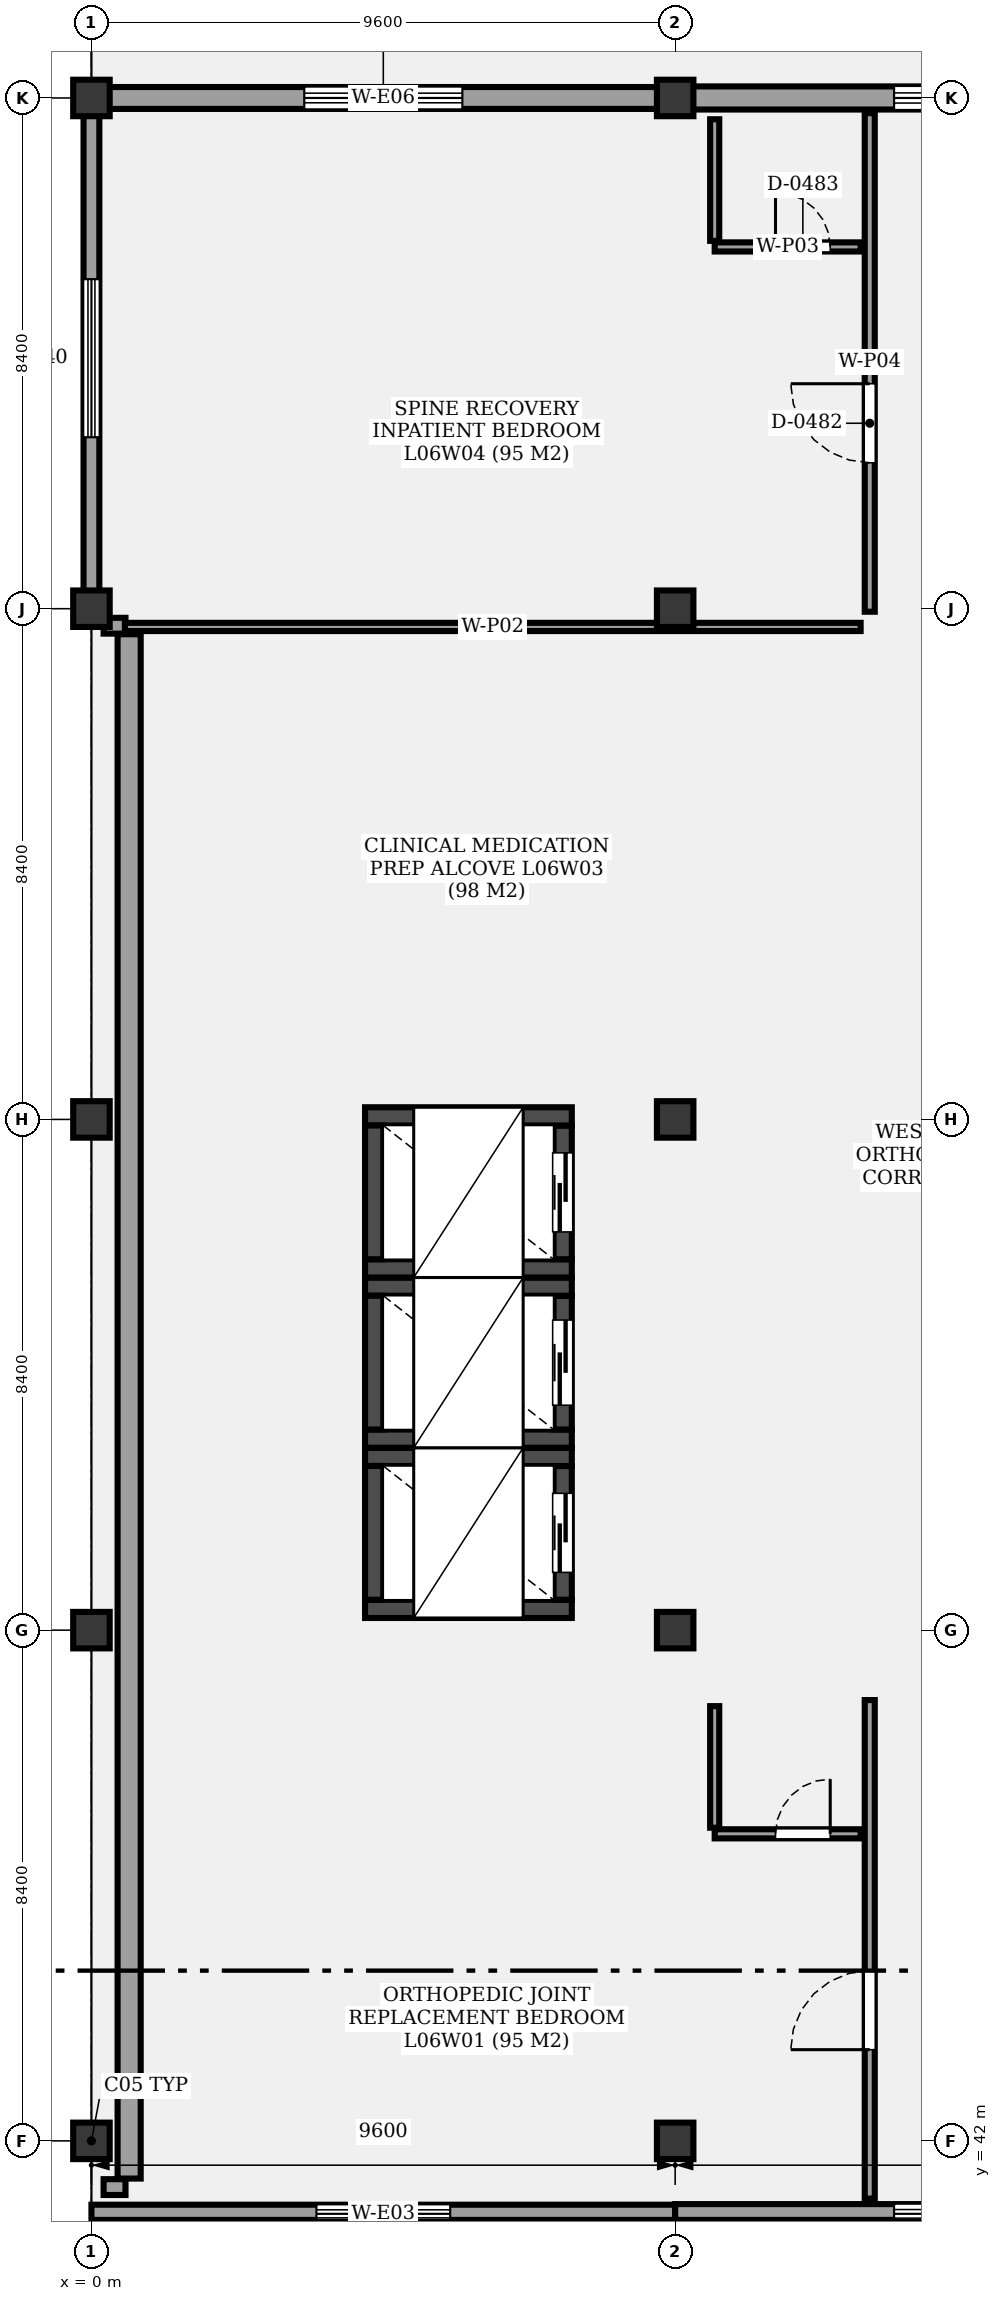
"""IFC4 building model, lengths in metres.
Left out: names, types, materials, properties, quantities, classifications, styles, units other than length and angle.
Written with IfcOpenShell. Run it as: python <this file> out.ifc"""

import sys

from ifc_helpers import new_model, si_unit, direction, frame, frame_2d, origin, origin_2d, place, context, subcontext, project, spatial, rectangle, extrude, element, fill, save


model = new_model("IFC4")
c1 = context("Model", 3, precision=1e-05, world=origin(), true_north=direction((0.0, 1.0)))
c2 = subcontext(c1, "Body", "Model", "MODEL_VIEW")
j1 = project(units=[si_unit("LENGTHUNIT", "METRE"), si_unit("PLANEANGLEUNIT", "RADIAN")], contexts=[c1])
p1 = place(None, origin())
s1 = spatial("IfcSite", under=j1, at=p1, CompositionType="ELEMENT")
p2 = place(p1, origin())
s2 = spatial("IfcBuilding", under=s1, at=p2, CompositionType="ELEMENT")
p3 = place(p2, frame((0.0, 0.0, 26.2)))
s3 = spatial("IfcBuildingStorey", under=s2, at=p3, CompositionType="ELEMENT", Elevation=26.2)
for number, where, z_axis, x_axis in (
    (1, (0.0, 42.0, 0.0), (0.0, 0.0, 1.0), (1.0, 0.0, 0.0)),
    (2, (0.0, 50.4, 0.0), (0.0, 0.0, 1.0), (1.0, 0.0, 0.0)),
    (3, (0.0, 58.8, 0.0), (0.0, 0.0, 1.0), (1.0, 0.0, 0.0)),
    (4, (0.0, 67.2, 0.0), (0.0, 0.0, 1.0), (1.0, 0.0, 0.0)),
    (5, (0.0, 75.6, 0.0), (0.0, 0.0, 1.0), (1.0, 0.0, 0.0)),
    (6, (9.6, 42.0, 0.0), (0.0, 0.0, 1.0), (1.0, 0.0, 0.0)),
    (7, (9.6, 50.4, 0.0), (0.0, 0.0, 1.0), (1.0, 0.0, 0.0)),
    (8, (9.6, 58.8, 0.0), (0.0, 0.0, 1.0), (1.0, 0.0, 0.0)),
    (9, (9.6, 67.2, 0.0), (0.0, 0.0, 1.0), (1.0, 0.0, 0.0)),
    (10, (9.6, 75.6, 0.0), (0.0, 0.0, 1.0), (1.0, 0.0, 0.0)),
):
    element("IfcColumn", number, at=place(p3, frame(where, z_axis=z_axis, x_axis=x_axis)), inside=s3, PredefinedType="COLUMN", context=c2, shape_type="SweptSolid", body=[
        extrude(rectangle(XDim=0.6, YDim=0.6, at=origin_2d()), origin(), (0.0, 0.0, 1.0), 4.2),
    ])
p4 = place(p3, frame((4.5, 50.75, 0.0), z_axis=(0.0, 0.0, 1.0), x_axis=(1.0, 0.0, 0.0)))
e11 = element("IfcWall", 11, at=p4, inside=s3, PredefinedType="SHEAR", context=c2, shape_type="SweptSolid", body=[
    extrude(rectangle(XDim=3.4, YDim=0.3, at=frame_2d((1.7, 0.0))), origin(), (0.0, 0.0, 1.0), 4.2),
])
p5 = place(p3, frame((7.75, 50.9, 0.0), z_axis=(0.0, 0.0, 1.0), x_axis=(0.0, 1.0, 0.0)))
e12 = element("IfcWall", 12, at=p5, inside=s3, PredefinedType="SHEAR", context=c2, shape_type="SweptSolid", body=[
    extrude(rectangle(XDim=2.2, YDim=0.3, at=frame_2d((1.1, 0.0))), origin(), (0.0, 0.0, 1.0), 4.2),
])
p6 = place(p5, frame((0.45, 0.0, 0.0)))
e13 = element("IfcOpeningElement", 13, at=p6, cuts=e12, PredefinedType="OPENING", context=c2, shape_type="SweptSolid", body=[
    extrude(rectangle(XDim=1.3, YDim=2.3, at=frame_2d((0.65, 1.15))), frame((0.0, 0.16, 0.0), z_axis=(0.0, -1.0, 0.0), x_axis=(1.0, 0.0, 0.0)), (0.0, 0.0, 1.0), 0.32),
])
p7 = place(p3, frame((7.9, 53.25, 0.0), z_axis=(0.0, 0.0, 1.0), x_axis=(-1.0, 0.0, 0.0)))
e14 = element("IfcWall", 14, at=p7, inside=s3, PredefinedType="SHEAR", context=c2, shape_type="SweptSolid", body=[
    extrude(rectangle(XDim=3.4, YDim=0.3, at=frame_2d((1.7, 0.0))), origin(), (0.0, 0.0, 1.0), 4.2),
])
p8 = place(p3, frame((4.65, 53.1, 0.0), z_axis=(0.0, 0.0, 1.0), x_axis=(0.0, -1.0, 0.0)))
e15 = element("IfcWall", 15, at=p8, inside=s3, PredefinedType="SHEAR", context=c2, shape_type="SweptSolid", body=[
    extrude(rectangle(XDim=2.2, YDim=0.3, at=frame_2d((1.1, 0.0))), origin(), (0.0, 0.0, 1.0), 4.2),
])
p9 = place(p3, frame((4.5, 53.55, 0.0), z_axis=(0.0, 0.0, 1.0), x_axis=(1.0, 0.0, 0.0)))
e16 = element("IfcWall", 16, at=p9, inside=s3, PredefinedType="SHEAR", context=c2, shape_type="SweptSolid", body=[
    extrude(rectangle(XDim=3.4, YDim=0.3, at=frame_2d((1.7, 0.0))), origin(), (0.0, 0.0, 1.0), 4.2),
])
p10 = place(p3, frame((7.75, 53.7, 0.0), z_axis=(0.0, 0.0, 1.0), x_axis=(0.0, 1.0, 0.0)))
e17 = element("IfcWall", 17, at=p10, inside=s3, PredefinedType="SHEAR", context=c2, shape_type="SweptSolid", body=[
    extrude(rectangle(XDim=2.2, YDim=0.3, at=frame_2d((1.1, 0.0))), origin(), (0.0, 0.0, 1.0), 4.2),
])
p11 = place(p10, frame((0.4, 0.0, 0.0)))
e18 = element("IfcOpeningElement", 18, at=p11, cuts=e17, PredefinedType="OPENING", context=c2, shape_type="SweptSolid", body=[
    extrude(rectangle(XDim=1.4, YDim=2.3, at=frame_2d((0.7, 1.15))), frame((0.0, 0.16, 0.0), z_axis=(0.0, -1.0, 0.0), x_axis=(1.0, 0.0, 0.0)), (0.0, 0.0, 1.0), 0.32),
])
p12 = place(p3, frame((7.9, 56.05, 0.0), z_axis=(0.0, 0.0, 1.0), x_axis=(-1.0, 0.0, 0.0)))
e19 = element("IfcWall", 19, at=p12, inside=s3, PredefinedType="SHEAR", context=c2, shape_type="SweptSolid", body=[
    extrude(rectangle(XDim=3.4, YDim=0.3, at=frame_2d((1.7, 0.0))), origin(), (0.0, 0.0, 1.0), 4.2),
])
p13 = place(p3, frame((4.65, 55.9, 0.0), z_axis=(0.0, 0.0, 1.0), x_axis=(0.0, -1.0, 0.0)))
e20 = element("IfcWall", 20, at=p13, inside=s3, PredefinedType="SHEAR", context=c2, shape_type="SweptSolid", body=[
    extrude(rectangle(XDim=2.2, YDim=0.3, at=frame_2d((1.1, 0.0))), origin(), (0.0, 0.0, 1.0), 4.2),
])
p14 = place(p3, frame((4.5, 56.35, 0.0), z_axis=(0.0, 0.0, 1.0), x_axis=(1.0, 0.0, 0.0)))
e21 = element("IfcWall", 21, at=p14, inside=s3, PredefinedType="SHEAR", context=c2, shape_type="SweptSolid", body=[
    extrude(rectangle(XDim=3.4, YDim=0.3, at=frame_2d((1.7, 0.0))), origin(), (0.0, 0.0, 1.0), 4.2),
])
p15 = place(p3, frame((7.75, 56.5, 0.0), z_axis=(0.0, 0.0, 1.0), x_axis=(0.0, 1.0, 0.0)))
e22 = element("IfcWall", 22, at=p15, inside=s3, PredefinedType="SHEAR", context=c2, shape_type="SweptSolid", body=[
    extrude(rectangle(XDim=2.2, YDim=0.3, at=frame_2d((1.1, 0.0))), origin(), (0.0, 0.0, 1.0), 4.2),
])
p16 = place(p15, frame((0.45, 0.0, 0.0)))
e23 = element("IfcOpeningElement", 23, at=p16, cuts=e22, PredefinedType="OPENING", context=c2, shape_type="SweptSolid", body=[
    extrude(rectangle(XDim=1.3, YDim=2.3, at=frame_2d((0.65, 1.15))), frame((0.0, 0.16, 0.0), z_axis=(0.0, -1.0, 0.0), x_axis=(1.0, 0.0, 0.0)), (0.0, 0.0, 1.0), 0.32),
])
p17 = place(p3, frame((7.9, 58.85, 0.0), z_axis=(0.0, 0.0, 1.0), x_axis=(-1.0, 0.0, 0.0)))
e24 = element("IfcWall", 24, at=p17, inside=s3, PredefinedType="SHEAR", context=c2, shape_type="SweptSolid", body=[
    extrude(rectangle(XDim=3.4, YDim=0.3, at=frame_2d((1.7, 0.0))), origin(), (0.0, 0.0, 1.0), 4.2),
])
p18 = place(p3, frame((4.65, 58.7, 0.0), z_axis=(0.0, 0.0, 1.0), x_axis=(0.0, -1.0, 0.0)))
e25 = element("IfcWall", 25, at=p18, inside=s3, PredefinedType="SHEAR", context=c2, shape_type="SweptSolid", body=[
    extrude(rectangle(XDim=2.2, YDim=0.3, at=frame_2d((1.1, 0.0))), origin(), (0.0, 0.0, 1.0), 4.2),
])
p19 = place(p3, frame((9.6, 40.8, 0.0), z_axis=(0.0, 0.0, 1.0), x_axis=(-1.0, 0.0, 0.0)))
e26 = element("IfcWall", 26, at=p19, inside=s3, PredefinedType="SOLIDWALL", context=c2, shape_type="SweptSolid", body=[
    extrude(rectangle(XDim=9.6, YDim=0.3, at=frame_2d((4.8, 0.0))), origin(), (0.0, 0.0, 1.0), 3.39),
])
p20 = place(p19, frame((3.7, 0.0, 0.85)))
e27 = element("IfcOpeningElement", 27, at=p20, cuts=e26, PredefinedType="OPENING", context=c2, shape_type="SweptSolid", body=[
    extrude(rectangle(XDim=2.2, YDim=1.4, at=frame_2d((1.1, 0.7))), frame((0.0, 0.16, 0.0), z_axis=(0.0, -1.0, 0.0), x_axis=(1.0, 0.0, 0.0)), (0.0, 0.0, 1.0), 0.32),
])
p21 = place(p3, frame((19.2, 40.8, 0.0), z_axis=(0.0, 0.0, 1.0), x_axis=(-1.0, 0.0, 0.0)))
e28 = element("IfcWall", 28, at=p21, inside=s3, PredefinedType="SOLIDWALL", context=c2, shape_type="SweptSolid", body=[
    extrude(rectangle(XDim=9.6, YDim=0.32, at=frame_2d((4.8, 0.0))), origin(), (0.0, 0.0, 1.0), 3.39),
])
p22 = place(p21, frame((3.6, 0.0, 0.85)))
e29 = element("IfcOpeningElement", 29, at=p22, cuts=e28, PredefinedType="OPENING", context=c2, shape_type="SweptSolid", body=[
    extrude(rectangle(XDim=2.4, YDim=1.4, at=frame_2d((1.2, 0.7))), frame((0.0, 0.17, 0.0), z_axis=(0.0, -1.0, 0.0), x_axis=(1.0, 0.0, 0.0)), (0.0, 0.0, 1.0), 0.34),
])
p23 = place(p3, frame((0.0, 75.6, 0.0), z_axis=(0.0, 0.0, 1.0), x_axis=(1.0, 0.0, 0.0)))
e30 = element("IfcWall", 30, at=p23, inside=s3, PredefinedType="SOLIDWALL", context=c2, shape_type="SweptSolid", body=[
    extrude(rectangle(XDim=9.6, YDim=0.36, at=frame_2d((4.8, 0.0))), origin(), (0.0, 0.0, 1.0), 3.39),
])
p24 = place(p23, frame((3.5, 0.0, 0.85)))
e31 = element("IfcOpeningElement", 31, at=p24, cuts=e30, PredefinedType="OPENING", context=c2, shape_type="SweptSolid", body=[
    extrude(rectangle(XDim=2.6, YDim=1.4, at=frame_2d((1.3, 0.7))), frame((0.0, 0.19, 0.0), z_axis=(0.0, -1.0, 0.0), x_axis=(1.0, 0.0, 0.0)), (0.0, 0.0, 1.0), 0.38),
])
p25 = place(p3, frame((9.6, 75.6, 0.0), z_axis=(0.0, 0.0, 1.0), x_axis=(1.0, 0.0, 0.0)))
e32 = element("IfcWall", 32, at=p25, inside=s3, PredefinedType="SOLIDWALL", context=c2, shape_type="SweptSolid", body=[
    extrude(rectangle(XDim=9.6, YDim=0.38, at=frame_2d((4.8, 0.0))), origin(), (0.0, 0.0, 1.0), 3.39),
])
p26 = place(p25, frame((3.6, 0.0, 0.85)))
e33 = element("IfcOpeningElement", 33, at=p26, cuts=e32, PredefinedType="OPENING", context=c2, shape_type="SweptSolid", body=[
    extrude(rectangle(XDim=2.4, YDim=1.4, at=frame_2d((1.2, 0.7))), frame((0.0, 0.2, 0.0), z_axis=(0.0, -1.0, 0.0), x_axis=(1.0, 0.0, 0.0)), (0.0, 0.0, 1.0), 0.4),
])
for number, where, z_axis, x_axis in (
    (34, (0.2, 41.24, 0.0), (0.0, 0.0, 1.0), (1.0, 0.0, 0.0)),
    (35, (0.2, 66.92, 0.0), (0.0, 0.0, 1.0), (1.0, 0.0, 0.0)),
):
    element("IfcWall", number, at=place(p3, frame(where, z_axis=z_axis, x_axis=x_axis)), inside=s3, PredefinedType="SOLIDWALL", context=c2, shape_type="SweptSolid", body=[
        extrude(rectangle(XDim=0.36, YDim=0.26, at=frame_2d((0.18, 0.0))), origin(), (0.0, 0.0, 1.0), 3.39),
    ])
p27 = place(p3, frame((0.62, 41.38, 0.0), z_axis=(0.0, 0.0, 1.0), x_axis=(0.0, 1.0, 0.0)))
e36 = element("IfcWall", 36, at=p27, inside=s3, PredefinedType="SOLIDWALL", context=c2, shape_type="SweptSolid", body=[
    extrude(rectangle(XDim=25.4, YDim=0.38, at=frame_2d((12.7, 0.0))), origin(), (0.0, 0.0, 1.0), 3.39),
])
p28 = place(p3, frame((0.0, 67.2, 0.0), z_axis=(0.0, 0.0, 1.0), x_axis=(0.0, 1.0, 0.0)))
e37 = element("IfcWall", 37, at=p28, inside=s3, PredefinedType="SOLIDWALL", context=c2, shape_type="SweptSolid", body=[
    extrude(rectangle(XDim=8.24, YDim=0.26, at=frame_2d((4.12, 0.0))), origin(), (0.0, 0.0, 1.0), 3.39),
])
p29 = place(p28, frame((2.82, 0.0, 0.85)))
e38 = element("IfcOpeningElement", 38, at=p29, cuts=e37, PredefinedType="OPENING", context=c2, shape_type="SweptSolid", body=[
    extrude(rectangle(XDim=2.6, YDim=1.4, at=frame_2d((1.3, 0.7))), frame((0.0, 0.14, 0.0), z_axis=(0.0, -1.0, 0.0), x_axis=(1.0, 0.0, 0.0)), (0.0, 0.0, 1.0), 0.28),
])
p30 = place(p3, frame((12.8, 41.05, 0.0), z_axis=(0.0, 0.0, 1.0), x_axis=(0.0, 1.0, 0.0)))
e39 = element("IfcWall", 39, at=p30, inside=s3, PredefinedType="PARTITIONING", context=c2, shape_type="SweptSolid", body=[
    extrude(rectangle(XDim=8.2, YDim=0.165, at=frame_2d((4.1, 0.0))), origin(), (0.0, 0.0, 1.0), 3.3),
])
p31 = place(p30, frame((2.45, 0.0, 0.0)))
e40 = element("IfcOpeningElement", 40, at=p31, cuts=e39, PredefinedType="OPENING", context=c2, shape_type="SweptSolid", body=[
    extrude(rectangle(XDim=1.3, YDim=2.2, at=frame_2d((0.65, 1.1))), frame((0.0, 0.093, 0.0), z_axis=(0.0, -1.0, 0.0), x_axis=(1.0, 0.0, 0.0)), (0.0, 0.0, 1.0), 0.185),
])
p32 = place(p3, frame((10.25, 47.05, 0.0), z_axis=(0.0, 0.0, 1.0), x_axis=(1.0, 0.0, 0.0)))
e41 = element("IfcWall", 41, at=p32, inside=s3, PredefinedType="PARTITIONING", context=c2, shape_type="SweptSolid", body=[
    extrude(rectangle(XDim=2.4, YDim=0.15, at=frame_2d((1.2, 0.0))), origin(), (0.0, 0.0, 1.0), 3.3),
])
p33 = place(p32, frame((1.0, 0.0, 0.0)))
e42 = element("IfcOpeningElement", 42, at=p33, cuts=e41, PredefinedType="OPENING", context=c2, shape_type="SweptSolid", body=[
    extrude(rectangle(XDim=0.9, YDim=2.1, at=frame_2d((0.45, 1.05))), frame((0.0, 0.085, 0.0), z_axis=(0.0, -1.0, 0.0), x_axis=(1.0, 0.0, 0.0)), (0.0, 0.0, 1.0), 0.17),
])
p34 = place(p3, frame((10.25, 47.15, 0.0), z_axis=(0.0, 0.0, 1.0), x_axis=(0.0, 1.0, 0.0)))
e43 = element("IfcWall", 43, at=p34, inside=s3, PredefinedType="PARTITIONING", context=c2, shape_type="SweptSolid", body=[
    extrude(rectangle(XDim=2.0, YDim=0.15, at=frame_2d((1.0, 0.0))), origin(), (0.0, 0.0, 1.0), 3.3),
])
p35 = place(p3, frame((12.8, 67.15, 0.0), z_axis=(0.0, 0.0, 1.0), x_axis=(0.0, 1.0, 0.0)))
e44 = element("IfcWall", 44, at=p35, inside=s3, PredefinedType="PARTITIONING", context=c2, shape_type="SweptSolid", body=[
    extrude(rectangle(XDim=8.2, YDim=0.165, at=frame_2d((4.1, 0.0))), origin(), (0.0, 0.0, 1.0), 3.3),
])
p36 = place(p35, frame((2.45, 0.0, 0.0)))
e45 = element("IfcOpeningElement", 45, at=p36, cuts=e44, PredefinedType="OPENING", context=c2, shape_type="SweptSolid", body=[
    extrude(rectangle(XDim=1.3, YDim=2.2, at=frame_2d((0.65, 1.1))), frame((0.0, 0.093, 0.0), z_axis=(0.0, -1.0, 0.0), x_axis=(1.0, 0.0, 0.0)), (0.0, 0.0, 1.0), 0.185),
])
p37 = place(p3, frame((10.25, 73.15, 0.0), z_axis=(0.0, 0.0, 1.0), x_axis=(1.0, 0.0, 0.0)))
e46 = element("IfcWall", 46, at=p37, inside=s3, PredefinedType="PARTITIONING", context=c2, shape_type="SweptSolid", body=[
    extrude(rectangle(XDim=2.4, YDim=0.15, at=frame_2d((1.2, 0.0))), origin(), (0.0, 0.0, 1.0), 3.3),
])
p38 = place(p37, frame((1.0, 0.0, 0.0)))
e47 = element("IfcOpeningElement", 47, at=p38, cuts=e46, PredefinedType="OPENING", context=c2, shape_type="SweptSolid", body=[
    extrude(rectangle(XDim=0.9, YDim=2.1, at=frame_2d((0.45, 1.05))), frame((0.0, 0.085, 0.0), z_axis=(0.0, -1.0, 0.0), x_axis=(1.0, 0.0, 0.0)), (0.0, 0.0, 1.0), 0.17),
])
p39 = place(p3, frame((10.25, 73.25, 0.0), z_axis=(0.0, 0.0, 1.0), x_axis=(0.0, 1.0, 0.0)))
e48 = element("IfcWall", 48, at=p39, inside=s3, PredefinedType="PARTITIONING", context=c2, shape_type="SweptSolid", body=[
    extrude(rectangle(XDim=2.0, YDim=0.15, at=frame_2d((1.0, 0.0))), origin(), (0.0, 0.0, 1.0), 3.3),
])
p40 = place(p3, frame((0.55, 66.9, 0.0), z_axis=(0.0, 0.0, 1.0), x_axis=(1.0, 0.0, 0.0)))
e49 = element("IfcWall", 49, at=p40, inside=s3, PredefinedType="PARTITIONING", context=c2, shape_type="SweptSolid", body=[
    extrude(rectangle(XDim=12.1, YDim=0.135, at=frame_2d((6.05, 0.0))), origin(), (0.0, 0.0, 1.0), 3.3),
])
p41 = place(p6, origin())
e50 = element("IfcDoor", 50, at=p41, inside=s3, OperationType="SLIDING_TO_LEFT", PredefinedType="DOOR", context=c2, shape_type="SweptSolid", body=[
    extrude(rectangle(XDim=1.3, YDim=2.3, at=frame_2d((0.65, 1.15))), frame((0.0, 0.025, 0.0), z_axis=(0.0, -1.0, 0.0), x_axis=(1.0, 0.0, 0.0)), (0.0, 0.0, 1.0), 0.05),
])
fill(e13, e50)
p42 = place(p11, origin())
e51 = element("IfcDoor", 51, at=p42, inside=s3, OperationType="SLIDING_TO_RIGHT", PredefinedType="DOOR", context=c2, shape_type="SweptSolid", body=[
    extrude(rectangle(XDim=1.4, YDim=2.3, at=frame_2d((0.7, 1.15))), frame((0.0, 0.025, 0.0), z_axis=(0.0, -1.0, 0.0), x_axis=(1.0, 0.0, 0.0)), (0.0, 0.0, 1.0), 0.05),
])
fill(e18, e51)
p43 = place(p16, origin())
e52 = element("IfcDoor", 52, at=p43, inside=s3, OperationType="SLIDING_TO_LEFT", PredefinedType="DOOR", context=c2, shape_type="SweptSolid", body=[
    extrude(rectangle(XDim=1.3, YDim=2.3, at=frame_2d((0.65, 1.15))), frame((0.0, 0.025, 0.0), z_axis=(0.0, -1.0, 0.0), x_axis=(1.0, 0.0, 0.0)), (0.0, 0.0, 1.0), 0.05),
])
fill(e23, e52)
p44 = place(p20, origin())
e53 = element("IfcWindow", 53, at=p44, inside=s3, PartitioningType="SINGLE_PANEL", PredefinedType="WINDOW", context=c2, shape_type="SweptSolid", body=[
    extrude(rectangle(XDim=2.2, YDim=1.4, at=frame_2d((1.1, 0.7))), frame((0.0, 0.03, 0.0), z_axis=(0.0, -1.0, 0.0), x_axis=(1.0, 0.0, 0.0)), (0.0, 0.0, 1.0), 0.06),
])
fill(e27, e53)
p45 = place(p22, origin())
e54 = element("IfcWindow", 54, at=p45, inside=s3, PartitioningType="SINGLE_PANEL", PredefinedType="WINDOW", context=c2, shape_type="SweptSolid", body=[
    extrude(rectangle(XDim=2.4, YDim=1.4, at=frame_2d((1.2, 0.7))), frame((0.0, 0.03, 0.0), z_axis=(0.0, -1.0, 0.0), x_axis=(1.0, 0.0, 0.0)), (0.0, 0.0, 1.0), 0.06),
])
fill(e29, e54)
p46 = place(p24, origin())
e55 = element("IfcWindow", 55, at=p46, inside=s3, PartitioningType="SINGLE_PANEL", PredefinedType="WINDOW", context=c2, shape_type="SweptSolid", body=[
    extrude(rectangle(XDim=2.6, YDim=1.4, at=frame_2d((1.3, 0.7))), frame((0.0, 0.03, 0.0), z_axis=(0.0, -1.0, 0.0), x_axis=(1.0, 0.0, 0.0)), (0.0, 0.0, 1.0), 0.06),
])
fill(e31, e55)
p47 = place(p26, origin())
e56 = element("IfcWindow", 56, at=p47, inside=s3, PartitioningType="SINGLE_PANEL", PredefinedType="WINDOW", context=c2, shape_type="SweptSolid", body=[
    extrude(rectangle(XDim=2.4, YDim=1.4, at=frame_2d((1.2, 0.7))), frame((0.0, 0.03, 0.0), z_axis=(0.0, -1.0, 0.0), x_axis=(1.0, 0.0, 0.0)), (0.0, 0.0, 1.0), 0.06),
])
fill(e33, e56)
p48 = place(p29, origin())
e57 = element("IfcWindow", 57, at=p48, inside=s3, PartitioningType="SINGLE_PANEL", PredefinedType="WINDOW", context=c2, shape_type="SweptSolid", body=[
    extrude(rectangle(XDim=2.6, YDim=1.4, at=frame_2d((1.3, 0.7))), frame((0.0, 0.03, 0.0), z_axis=(0.0, -1.0, 0.0), x_axis=(1.0, 0.0, 0.0)), (0.0, 0.0, 1.0), 0.06),
])
fill(e38, e57)
p49 = place(p31, origin())
e58 = element("IfcDoor", 58, at=p49, inside=s3, OperationType="SINGLE_SWING_LEFT", PredefinedType="DOOR", context=c2, shape_type="SweptSolid", body=[
    extrude(rectangle(XDim=1.3, YDim=2.2, at=frame_2d((0.65, 1.1))), frame((0.0, 0.025, 0.0), z_axis=(0.0, -1.0, 0.0), x_axis=(1.0, 0.0, 0.0)), (0.0, 0.0, 1.0), 0.05),
])
fill(e40, e58)
p50 = place(p33, origin())
e59 = element("IfcDoor", 59, at=p50, inside=s3, OperationType="SINGLE_SWING_RIGHT", PredefinedType="DOOR", context=c2, shape_type="SweptSolid", body=[
    extrude(rectangle(XDim=0.9, YDim=2.1, at=frame_2d((0.45, 1.05))), frame((0.0, 0.025, 0.0), z_axis=(0.0, -1.0, 0.0), x_axis=(1.0, 0.0, 0.0)), (0.0, 0.0, 1.0), 0.05),
])
fill(e42, e59)
p51 = place(p36, origin())
e60 = element("IfcDoor", 60, at=p51, inside=s3, OperationType="SINGLE_SWING_RIGHT", PredefinedType="DOOR", context=c2, shape_type="SweptSolid", body=[
    extrude(rectangle(XDim=1.3, YDim=2.2, at=frame_2d((0.65, 1.1))), frame((0.0, 0.025, 0.0), z_axis=(0.0, -1.0, 0.0), x_axis=(1.0, 0.0, 0.0)), (0.0, 0.0, 1.0), 0.05),
])
fill(e45, e60)
p52 = place(p38, origin())
e61 = element("IfcDoor", 61, at=p52, inside=s3, OperationType="SINGLE_SWING_LEFT", PredefinedType="DOOR", context=c2, shape_type="SweptSolid", body=[
    extrude(rectangle(XDim=0.9, YDim=2.1, at=frame_2d((0.45, 1.05))), frame((0.0, 0.025, 0.0), z_axis=(0.0, -1.0, 0.0), x_axis=(1.0, 0.0, 0.0)), (0.0, 0.0, 1.0), 0.05),
])
fill(e47, e61)
save(model, sys.argv[1])
